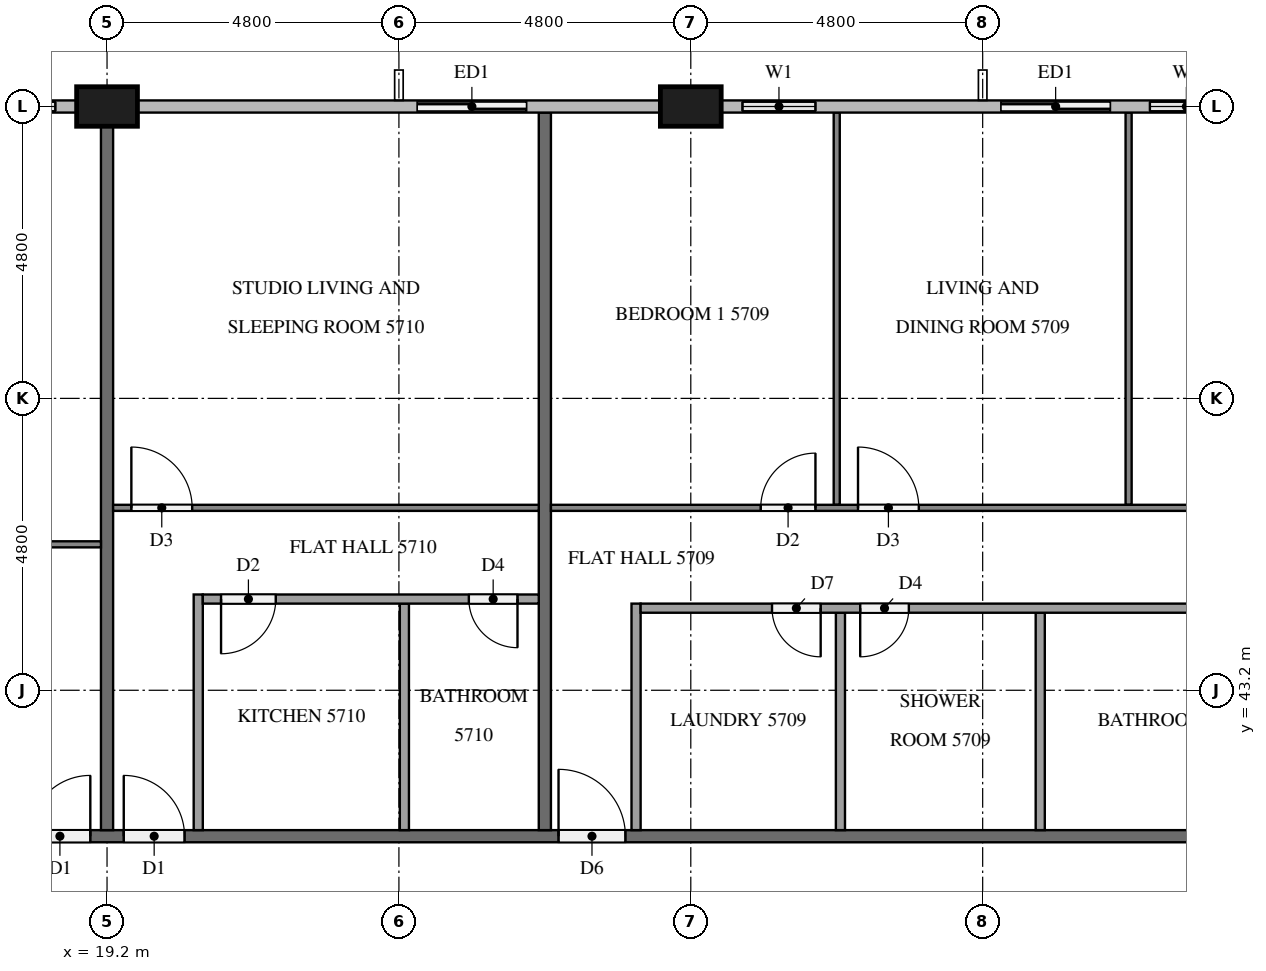
"""IFC4 building model, lengths in metres.
Left out: names, types, materials, properties, quantities, classifications, styles, units other than length and angle.
Written with IfcOpenShell. Run it as: python <this file> out.ifc"""

import sys

from ifc_helpers import new_model, si_unit, direction, frame, frame_2d, origin, origin_2d, place, context, subcontext, project, spatial, rectangle, extrude, element, fill, save


model = new_model("IFC4")
c1 = context("Model", 3, precision=1e-05, world=origin(), true_north=direction((0.0, 1.0)))
c2 = subcontext(c1, "Body", "Model", "MODEL_VIEW")
j1 = project(units=[si_unit("LENGTHUNIT", "METRE"), si_unit("PLANEANGLEUNIT", "RADIAN")], contexts=[c1])
p1 = place(None, origin())
s1 = spatial("IfcSite", under=j1, at=p1, CompositionType="ELEMENT")
p2 = place(p1, origin())
s2 = spatial("IfcBuilding", under=s1, at=p2, CompositionType="ELEMENT")
p3 = place(p2, frame((0.0, 0.0, 219.3)))
s3 = spatial("IfcBuildingStorey", under=s2, at=p3, CompositionType="ELEMENT", Elevation=219.3)
for number, where, z_axis, x_axis in (
    (1, (28.8, 52.8, 0.0), (0.0, 0.0, 1.0), (1.0, 0.0, 0.0)),
    (2, (19.2, 52.8, 0.0), (0.0, 0.0, 1.0), (1.0, 0.0, 0.0)),
):
    element("IfcColumn", number, at=place(p3, frame(where, z_axis=z_axis, x_axis=x_axis)), inside=s3, PredefinedType="COLUMN", context=c2, shape_type="SweptSolid", body=[
        extrude(rectangle(XDim=1.0, YDim=0.65, at=origin_2d()), origin(), (0.0, 0.0, 1.0), 3.2),
    ])
p4 = place(p3, frame((37.9, 52.8, 0.0), z_axis=(0.0, 0.0, 1.0), x_axis=(-1.0, 0.0, 0.0)))
e3 = element("IfcWall", 3, at=p4, inside=s3, PredefinedType="SOLIDWALL", context=c2, shape_type="SweptSolid", body=[
    extrude(rectangle(XDim=4.3, YDim=0.15, at=frame_2d((2.15, 0.0))), origin(), (0.0, 0.0, 1.0), 3.2),
])
p5 = place(p4, frame((0.35, 0.0, 0.9)))
e4 = element("IfcOpeningElement", 4, at=p5, cuts=e3, PredefinedType="OPENING", context=c2, shape_type="SweptSolid", body=[
    extrude(rectangle(XDim=1.2, YDim=1.4, at=frame_2d((0.6, 0.7))), frame((0.0, 0.085, 0.0), z_axis=(0.0, -1.0, 0.0), x_axis=(1.0, 0.0, 0.0)), (0.0, 0.0, 1.0), 0.17),
])
p6 = place(p4, frame((2.2, 0.0, 0.0)))
e5 = element("IfcOpeningElement", 5, at=p6, cuts=e3, PredefinedType="OPENING", context=c2, shape_type="SweptSolid", body=[
    extrude(rectangle(XDim=1.8, YDim=2.4, at=frame_2d((0.9, 1.2))), frame((0.0, 0.085, 0.0), z_axis=(0.0, -1.0, 0.0), x_axis=(1.0, 0.0, 0.0)), (0.0, 0.0, 1.0), 0.17),
])
p7 = place(p3, frame((31.2, 52.8, 0.0), z_axis=(0.0, 0.0, 1.0), x_axis=(-1.0, 0.0, 0.0)))
e6 = element("IfcWall", 6, at=p7, inside=s3, PredefinedType="SOLIDWALL", context=c2, shape_type="SweptSolid", body=[
    extrude(rectangle(XDim=1.9, YDim=0.15, at=frame_2d((0.95, 0.0))), origin(), (0.0, 0.0, 1.0), 3.2),
])
p8 = place(p7, frame((0.35, 0.0, 0.9)))
e7 = element("IfcOpeningElement", 7, at=p8, cuts=e6, PredefinedType="OPENING", context=c2, shape_type="SweptSolid", body=[
    extrude(rectangle(XDim=1.2, YDim=1.4, at=frame_2d((0.6, 0.7))), frame((0.0, 0.085, 0.0), z_axis=(0.0, -1.0, 0.0), x_axis=(1.0, 0.0, 0.0)), (0.0, 0.0, 1.0), 0.17),
])
p9 = place(p3, frame((26.4, 52.8, 0.0), z_axis=(0.0, 0.0, 1.0), x_axis=(-1.0, 0.0, 0.0)))
e8 = element("IfcWall", 8, at=p9, inside=s3, PredefinedType="SOLIDWALL", context=c2, shape_type="SweptSolid", body=[
    extrude(rectangle(XDim=2.4, YDim=0.15, at=frame_2d((1.2, 0.0))), origin(), (0.0, 0.0, 1.0), 3.2),
])
p10 = place(p9, frame((0.3, 0.0, 0.0)))
e9 = element("IfcOpeningElement", 9, at=p10, cuts=e8, PredefinedType="OPENING", context=c2, shape_type="SweptSolid", body=[
    extrude(rectangle(XDim=1.8, YDim=2.4, at=frame_2d((0.9, 1.2))), frame((0.0, 0.085, 0.0), z_axis=(0.0, -1.0, 0.0), x_axis=(1.0, 0.0, 0.0)), (0.0, 0.0, 1.0), 0.17),
])
p11 = place(p3, frame((18.7, 52.8, 0.0), z_axis=(0.0, 0.0, 1.0), x_axis=(-1.0, 0.0, 0.0)))
e10 = element("IfcWall", 10, at=p11, inside=s3, PredefinedType="SOLIDWALL", context=c2, shape_type="SweptSolid", body=[
    extrude(rectangle(XDim=1.9, YDim=0.15, at=frame_2d((0.95, 0.0))), origin(), (0.0, 0.0, 1.0), 3.2),
])
p12 = place(p11, frame((0.35, 0.0, 0.9)))
e11 = element("IfcOpeningElement", 11, at=p12, cuts=e10, PredefinedType="OPENING", context=c2, shape_type="SweptSolid", body=[
    extrude(rectangle(XDim=1.2, YDim=1.4, at=frame_2d((0.6, 0.7))), frame((0.0, 0.085, 0.0), z_axis=(0.0, -1.0, 0.0), x_axis=(1.0, 0.0, 0.0)), (0.0, 0.0, 1.0), 0.17),
])
p13 = place(p3, frame((11.9, 40.8, 0.0), z_axis=(0.0, 0.0, 1.0), x_axis=(1.0, 0.0, 0.0)))
e12 = element("IfcWall", 12, at=p13, inside=s3, PredefinedType="PARTITIONING", context=c2, shape_type="SweptSolid", body=[
    extrude(rectangle(XDim=38.6, YDim=0.2, at=frame_2d((19.3, 0.0))), origin(), (0.0, 0.0, 1.0), 3.2),
])
p14 = place(p13, frame((33.975, 0.0, 0.0)))
e13 = element("IfcOpeningElement", 13, at=p14, cuts=e12, PredefinedType="OPENING", context=c2, shape_type="SweptSolid", body=[
    extrude(rectangle(XDim=1.0, YDim=2.1, at=frame_2d((0.5, 1.05))), frame((0.0, 0.11, 0.0), z_axis=(0.0, -1.0, 0.0), x_axis=(1.0, 0.0, 0.0)), (0.0, 0.0, 1.0), 0.22),
])
p15 = place(p13, frame((14.725, 0.0, 0.0)))
e14 = element("IfcOpeningElement", 14, at=p15, cuts=e12, PredefinedType="OPENING", context=c2, shape_type="SweptSolid", body=[
    extrude(rectangle(XDim=1.1, YDim=2.1, at=frame_2d((0.55, 1.05))), frame((0.0, 0.11, 0.0), z_axis=(0.0, -1.0, 0.0), x_axis=(1.0, 0.0, 0.0)), (0.0, 0.0, 1.0), 0.22),
])
p16 = place(p13, frame((7.575, 0.0, 0.0)))
e15 = element("IfcOpeningElement", 15, at=p16, cuts=e12, PredefinedType="OPENING", context=c2, shape_type="SweptSolid", body=[
    extrude(rectangle(XDim=1.0, YDim=2.1, at=frame_2d((0.5, 1.05))), frame((0.0, 0.11, 0.0), z_axis=(0.0, -1.0, 0.0), x_axis=(1.0, 0.0, 0.0)), (0.0, 0.0, 1.0), 0.22),
])
p17 = place(p13, frame((6.025, 0.0, 0.0)))
e16 = element("IfcOpeningElement", 16, at=p17, cuts=e12, PredefinedType="OPENING", context=c2, shape_type="SweptSolid", body=[
    extrude(rectangle(XDim=1.0, YDim=2.1, at=frame_2d((0.5, 1.05))), frame((0.0, 0.11, 0.0), z_axis=(0.0, -1.0, 0.0), x_axis=(1.0, 0.0, 0.0)), (0.0, 0.0, 1.0), 0.22),
])
p18 = place(p3, frame((26.4, 52.7, 0.0), z_axis=(0.0, 0.0, 1.0), x_axis=(0.0, -1.0, 0.0)))
e17 = element("IfcWall", 17, at=p18, inside=s3, PredefinedType="PARTITIONING", context=c2, shape_type="SweptSolid", body=[
    extrude(rectangle(XDim=11.8, YDim=0.2, at=frame_2d((5.9, 0.0))), origin(), (0.0, 0.0, 1.0), 3.2),
])
p19 = place(p3, frame((19.2, 52.475, 0.0), z_axis=(0.0, 0.0, 1.0), x_axis=(0.0, -1.0, 0.0)))
e18 = element("IfcWall", 18, at=p19, inside=s3, PredefinedType="PARTITIONING", context=c2, shape_type="SweptSolid", body=[
    extrude(rectangle(XDim=11.575, YDim=0.2, at=frame_2d((5.788, 0.0))), origin(), (0.0, 0.0, 1.0), 3.2),
])
for number, where, z_axis, x_axis in (
    (19, (31.2, 46.25, 0.0), (0.0, 0.0, 1.0), (0.0, 1.0, 0.0)),
    (20, (36.0, 46.25, 0.0), (0.0, 0.0, 1.0), (0.0, 1.0, 0.0)),
):
    element("IfcWall", number, at=place(p3, frame(where, z_axis=z_axis, x_axis=x_axis)), inside=s3, PredefinedType="PARTITIONING", context=c2, shape_type="SweptSolid", body=[
        extrude(rectangle(XDim=6.45, YDim=0.1, at=frame_2d((3.225, 0.0))), origin(), (0.0, 0.0, 1.0), 3.2),
    ])
p20 = place(p3, frame((26.5, 46.2, 0.0), z_axis=(0.0, 0.0, 1.0), x_axis=(1.0, 0.0, 0.0)))
e21 = element("IfcWall", 21, at=p20, inside=s3, PredefinedType="PARTITIONING", context=c2, shape_type="SweptSolid", body=[
    extrude(rectangle(XDim=19.0, YDim=0.1, at=frame_2d((9.5, 0.0))), origin(), (0.0, 0.0, 1.0), 3.2),
])
p21 = place(p20, frame((3.45, 0.0, 0.0)))
e22 = element("IfcOpeningElement", 22, at=p21, cuts=e21, PredefinedType="OPENING", context=c2, shape_type="SweptSolid", body=[
    extrude(rectangle(XDim=0.9, YDim=2.1, at=frame_2d((0.45, 1.05))), frame((0.0, 0.06, 0.0), z_axis=(0.0, -1.0, 0.0), x_axis=(1.0, 0.0, 0.0)), (0.0, 0.0, 1.0), 0.12),
])
p22 = place(p20, frame((5.05, 0.0, 0.0)))
e23 = element("IfcOpeningElement", 23, at=p22, cuts=e21, PredefinedType="OPENING", context=c2, shape_type="SweptSolid", body=[
    extrude(rectangle(XDim=1.0, YDim=2.1, at=frame_2d((0.5, 1.05))), frame((0.0, 0.06, 0.0), z_axis=(0.0, -1.0, 0.0), x_axis=(1.0, 0.0, 0.0)), (0.0, 0.0, 1.0), 0.12),
])
p23 = place(p20, frame((13.05, 0.0, 0.0)))
e24 = element("IfcOpeningElement", 24, at=p23, cuts=e21, PredefinedType="OPENING", context=c2, shape_type="SweptSolid", body=[
    extrude(rectangle(XDim=0.9, YDim=2.1, at=frame_2d((0.45, 1.05))), frame((0.0, 0.06, 0.0), z_axis=(0.0, -1.0, 0.0), x_axis=(1.0, 0.0, 0.0)), (0.0, 0.0, 1.0), 0.12),
])
p24 = place(p20, frame((14.65, 0.0, 0.0)))
e25 = element("IfcOpeningElement", 25, at=p24, cuts=e21, PredefinedType="OPENING", context=c2, shape_type="SweptSolid", body=[
    extrude(rectangle(XDim=0.9, YDim=2.1, at=frame_2d((0.45, 1.05))), frame((0.0, 0.06, 0.0), z_axis=(0.0, -1.0, 0.0), x_axis=(1.0, 0.0, 0.0)), (0.0, 0.0, 1.0), 0.12),
])
for number, where, z_axis, x_axis in (
    (26, (31.261, 40.9, 0.0), (0.0, 0.0, 1.0), (0.0, 1.0, 0.0)),
    (27, (34.547, 40.9, 0.0), (0.0, 0.0, 1.0), (0.0, 1.0, 0.0)),
):
    element("IfcWall", number, at=place(p3, frame(where, z_axis=z_axis, x_axis=x_axis)), inside=s3, PredefinedType="PARTITIONING", context=c2, shape_type="SweptSolid", body=[
        extrude(rectangle(XDim=3.575, YDim=0.15, at=frame_2d((1.788, 0.0))), origin(), (0.0, 0.0, 1.0), 3.2),
    ])
p25 = place(p3, frame((27.9, 40.9, 0.0), z_axis=(0.0, 0.0, 1.0), x_axis=(0.0, 1.0, 0.0)))
e28 = element("IfcWall", 28, at=p25, inside=s3, PredefinedType="PARTITIONING", context=c2, shape_type="SweptSolid", body=[
    extrude(rectangle(XDim=3.725, YDim=0.15, at=frame_2d((1.863, 0.0))), origin(), (0.0, 0.0, 1.0), 3.2),
])
p26 = place(p3, frame((45.5, 44.55, 0.0), z_axis=(0.0, 0.0, 1.0), x_axis=(-1.0, 0.0, 0.0)))
e29 = element("IfcWall", 29, at=p26, inside=s3, PredefinedType="PARTITIONING", context=c2, shape_type="SweptSolid", body=[
    extrude(rectangle(XDim=17.525, YDim=0.15, at=frame_2d((8.762, 0.0))), origin(), (0.0, 0.0, 1.0), 3.2),
])
p27 = place(p26, frame((14.564, 0.0, 0.0)))
e30 = element("IfcOpeningElement", 30, at=p27, cuts=e29, PredefinedType="OPENING", context=c2, shape_type="SweptSolid", body=[
    extrude(rectangle(XDim=0.8, YDim=2.1, at=frame_2d((0.4, 1.05))), frame((0.0, 0.085, 0.0), z_axis=(0.0, -1.0, 0.0), x_axis=(1.0, 0.0, 0.0)), (0.0, 0.0, 1.0), 0.17),
])
p28 = place(p26, frame((13.114, 0.0, 0.0)))
e31 = element("IfcOpeningElement", 31, at=p28, cuts=e29, PredefinedType="OPENING", context=c2, shape_type="SweptSolid", body=[
    extrude(rectangle(XDim=0.8, YDim=2.1, at=frame_2d((0.4, 1.05))), frame((0.0, 0.085, 0.0), z_axis=(0.0, -1.0, 0.0), x_axis=(1.0, 0.0, 0.0)), (0.0, 0.0, 1.0), 0.17),
])
p29 = place(p26, frame((6.897, 0.0, 0.0)))
e32 = element("IfcOpeningElement", 32, at=p29, cuts=e29, PredefinedType="OPENING", context=c2, shape_type="SweptSolid", body=[
    extrude(rectangle(XDim=0.9, YDim=2.1, at=frame_2d((0.45, 1.05))), frame((0.0, 0.085, 0.0), z_axis=(0.0, -1.0, 0.0), x_axis=(1.0, 0.0, 0.0)), (0.0, 0.0, 1.0), 0.17),
])
p30 = place(p26, frame((5.347, 0.0, 0.0)))
e33 = element("IfcOpeningElement", 33, at=p30, cuts=e29, PredefinedType="OPENING", context=c2, shape_type="SweptSolid", body=[
    extrude(rectangle(XDim=0.9, YDim=2.1, at=frame_2d((0.45, 1.05))), frame((0.0, 0.085, 0.0), z_axis=(0.0, -1.0, 0.0), x_axis=(1.0, 0.0, 0.0)), (0.0, 0.0, 1.0), 0.17),
])
p31 = place(p3, frame((19.3, 46.2, 0.0), z_axis=(0.0, 0.0, 1.0), x_axis=(1.0, 0.0, 0.0)))
e34 = element("IfcWall", 34, at=p31, inside=s3, PredefinedType="PARTITIONING", context=c2, shape_type="SweptSolid", body=[
    extrude(rectangle(XDim=7.0, YDim=0.1, at=frame_2d((3.5, 0.0))), origin(), (0.0, 0.0, 1.0), 3.2),
])
p32 = place(p31, frame((0.3, 0.0, 0.0)))
e35 = element("IfcOpeningElement", 35, at=p32, cuts=e34, PredefinedType="OPENING", context=c2, shape_type="SweptSolid", body=[
    extrude(rectangle(XDim=1.0, YDim=2.1, at=frame_2d((0.5, 1.05))), frame((0.0, 0.06, 0.0), z_axis=(0.0, -1.0, 0.0), x_axis=(1.0, 0.0, 0.0)), (0.0, 0.0, 1.0), 0.12),
])
p33 = place(p3, frame((24.09, 40.9, 0.0), z_axis=(0.0, 0.0, 1.0), x_axis=(0.0, 1.0, 0.0)))
e36 = element("IfcWall", 36, at=p33, inside=s3, PredefinedType="PARTITIONING", context=c2, shape_type="SweptSolid", body=[
    extrude(rectangle(XDim=3.725, YDim=0.15, at=frame_2d((1.863, 0.0))), origin(), (0.0, 0.0, 1.0), 3.2),
])
p34 = place(p3, frame((20.7, 40.9, 0.0), z_axis=(0.0, 0.0, 1.0), x_axis=(0.0, 1.0, 0.0)))
e37 = element("IfcWall", 37, at=p34, inside=s3, PredefinedType="PARTITIONING", context=c2, shape_type="SweptSolid", body=[
    extrude(rectangle(XDim=3.875, YDim=0.15, at=frame_2d((1.938, 0.0))), origin(), (0.0, 0.0, 1.0), 3.2),
])
p35 = place(p3, frame((26.3, 44.7, 0.0), z_axis=(0.0, 0.0, 1.0), x_axis=(-1.0, 0.0, 0.0)))
e38 = element("IfcWall", 38, at=p35, inside=s3, PredefinedType="PARTITIONING", context=c2, shape_type="SweptSolid", body=[
    extrude(rectangle(XDim=5.525, YDim=0.15, at=frame_2d((2.763, 0.0))), origin(), (0.0, 0.0, 1.0), 3.2),
])
p36 = place(p35, frame((4.325, 0.0, 0.0)))
e39 = element("IfcOpeningElement", 39, at=p36, cuts=e38, PredefinedType="OPENING", context=c2, shape_type="SweptSolid", body=[
    extrude(rectangle(XDim=0.9, YDim=2.1, at=frame_2d((0.45, 1.05))), frame((0.0, 0.085, 0.0), z_axis=(0.0, -1.0, 0.0), x_axis=(1.0, 0.0, 0.0)), (0.0, 0.0, 1.0), 0.17),
])
p37 = place(p35, frame((0.35, 0.0, 0.0)))
e40 = element("IfcOpeningElement", 40, at=p37, cuts=e38, PredefinedType="OPENING", context=c2, shape_type="SweptSolid", body=[
    extrude(rectangle(XDim=0.8, YDim=2.1, at=frame_2d((0.4, 1.05))), frame((0.0, 0.085, 0.0), z_axis=(0.0, -1.0, 0.0), x_axis=(1.0, 0.0, 0.0)), (0.0, 0.0, 1.0), 0.17),
])
p38 = place(p3, frame((4.9, 45.6, 0.0), z_axis=(0.0, 0.0, 1.0), x_axis=(1.0, 0.0, 0.0)))
e41 = element("IfcWall", 41, at=p38, inside=s3, PredefinedType="PARTITIONING", context=c2, shape_type="SweptSolid", body=[
    extrude(rectangle(XDim=14.2, YDim=0.1, at=frame_2d((7.1, 0.0))), origin(), (0.0, 0.0, 1.0), 3.2),
])
p39 = place(p38, frame((9.85, 0.0, 0.0)))
e42 = element("IfcOpeningElement", 42, at=p39, cuts=e41, PredefinedType="OPENING", context=c2, shape_type="SweptSolid", body=[
    extrude(rectangle(XDim=0.9, YDim=2.1, at=frame_2d((0.45, 1.05))), frame((0.0, 0.06, 0.0), z_axis=(0.0, -1.0, 0.0), x_axis=(1.0, 0.0, 0.0)), (0.0, 0.0, 1.0), 0.12),
])
p40 = place(p38, frame((8.25, 0.0, 0.0)))
e43 = element("IfcOpeningElement", 43, at=p40, cuts=e41, PredefinedType="OPENING", context=c2, shape_type="SweptSolid", body=[
    extrude(rectangle(XDim=0.9, YDim=2.1, at=frame_2d((0.45, 1.05))), frame((0.0, 0.06, 0.0), z_axis=(0.0, -1.0, 0.0), x_axis=(1.0, 0.0, 0.0)), (0.0, 0.0, 1.0), 0.12),
])
p41 = place(p38, frame((0.3, 0.0, 0.0)))
e44 = element("IfcOpeningElement", 44, at=p41, cuts=e41, PredefinedType="OPENING", context=c2, shape_type="SweptSolid", body=[
    extrude(rectangle(XDim=1.0, YDim=2.1, at=frame_2d((0.5, 1.05))), frame((0.0, 0.06, 0.0), z_axis=(0.0, -1.0, 0.0), x_axis=(1.0, 0.0, 0.0)), (0.0, 0.0, 1.0), 0.12),
])
p42 = place(p5, origin())
e45 = element("IfcWindow", 45, at=p42, inside=s3, PartitioningType="SINGLE_PANEL", PredefinedType="WINDOW", context=c2, shape_type="SweptSolid", body=[
    extrude(rectangle(XDim=1.2, YDim=1.4, at=frame_2d((0.6, 0.7))), frame((0.0, 0.03, 0.0), z_axis=(0.0, -1.0, 0.0), x_axis=(1.0, 0.0, 0.0)), (0.0, 0.0, 1.0), 0.06),
])
fill(e4, e45)
p43 = place(p6, origin())
e46 = element("IfcDoor", 46, at=p43, inside=s3, OperationType="SLIDING_TO_LEFT", PredefinedType="DOOR", context=c2, shape_type="SweptSolid", body=[
    extrude(rectangle(XDim=1.8, YDim=2.4, at=frame_2d((0.9, 1.2))), frame((0.0, 0.025, 0.0), z_axis=(0.0, -1.0, 0.0), x_axis=(1.0, 0.0, 0.0)), (0.0, 0.0, 1.0), 0.05),
])
fill(e5, e46)
p44 = place(p8, origin())
e47 = element("IfcWindow", 47, at=p44, inside=s3, PartitioningType="SINGLE_PANEL", PredefinedType="WINDOW", context=c2, shape_type="SweptSolid", body=[
    extrude(rectangle(XDim=1.2, YDim=1.4, at=frame_2d((0.6, 0.7))), frame((0.0, 0.03, 0.0), z_axis=(0.0, -1.0, 0.0), x_axis=(1.0, 0.0, 0.0)), (0.0, 0.0, 1.0), 0.06),
])
fill(e7, e47)
p45 = place(p10, origin())
e48 = element("IfcDoor", 48, at=p45, inside=s3, OperationType="SLIDING_TO_RIGHT", PredefinedType="DOOR", context=c2, shape_type="SweptSolid", body=[
    extrude(rectangle(XDim=1.8, YDim=2.4, at=frame_2d((0.9, 1.2))), frame((0.0, 0.025, 0.0), z_axis=(0.0, -1.0, 0.0), x_axis=(1.0, 0.0, 0.0)), (0.0, 0.0, 1.0), 0.05),
])
fill(e9, e48)
p46 = place(p12, origin())
e49 = element("IfcWindow", 49, at=p46, inside=s3, PartitioningType="SINGLE_PANEL", PredefinedType="WINDOW", context=c2, shape_type="SweptSolid", body=[
    extrude(rectangle(XDim=1.2, YDim=1.4, at=frame_2d((0.6, 0.7))), frame((0.0, 0.03, 0.0), z_axis=(0.0, -1.0, 0.0), x_axis=(1.0, 0.0, 0.0)), (0.0, 0.0, 1.0), 0.06),
])
fill(e11, e49)
p47 = place(p15, origin())
e50 = element("IfcDoor", 50, at=p47, inside=s3, OperationType="SINGLE_SWING_LEFT", PredefinedType="DOOR", context=c2, shape_type="SweptSolid", body=[
    extrude(rectangle(XDim=1.1, YDim=2.1, at=frame_2d((0.55, 1.05))), frame((0.0, 0.025, 0.0), z_axis=(0.0, -1.0, 0.0), x_axis=(1.0, 0.0, 0.0)), (0.0, 0.0, 1.0), 0.05),
])
fill(e14, e50)
p48 = place(p16, origin())
e51 = element("IfcDoor", 51, at=p48, inside=s3, OperationType="SINGLE_SWING_LEFT", PredefinedType="DOOR", context=c2, shape_type="SweptSolid", body=[
    extrude(rectangle(XDim=1.0, YDim=2.1, at=frame_2d((0.5, 1.05))), frame((0.0, 0.025, 0.0), z_axis=(0.0, -1.0, 0.0), x_axis=(1.0, 0.0, 0.0)), (0.0, 0.0, 1.0), 0.05),
])
fill(e15, e51)
p49 = place(p17, origin())
e52 = element("IfcDoor", 52, at=p49, inside=s3, OperationType="SINGLE_SWING_RIGHT", PredefinedType="DOOR", context=c2, shape_type="SweptSolid", body=[
    extrude(rectangle(XDim=1.0, YDim=2.1, at=frame_2d((0.5, 1.05))), frame((0.0, 0.025, 0.0), z_axis=(0.0, -1.0, 0.0), x_axis=(1.0, 0.0, 0.0)), (0.0, 0.0, 1.0), 0.05),
])
fill(e16, e52)
p50 = place(p21, origin())
e53 = element("IfcDoor", 53, at=p50, inside=s3, OperationType="SINGLE_SWING_RIGHT", PredefinedType="DOOR", context=c2, shape_type="SweptSolid", body=[
    extrude(rectangle(XDim=0.9, YDim=2.1, at=frame_2d((0.45, 1.05))), frame((0.0, 0.025, 0.0), z_axis=(0.0, -1.0, 0.0), x_axis=(1.0, 0.0, 0.0)), (0.0, 0.0, 1.0), 0.05),
])
fill(e22, e53)
p51 = place(p22, origin())
e54 = element("IfcDoor", 54, at=p51, inside=s3, OperationType="SINGLE_SWING_LEFT", PredefinedType="DOOR", context=c2, shape_type="SweptSolid", body=[
    extrude(rectangle(XDim=1.0, YDim=2.1, at=frame_2d((0.5, 1.05))), frame((0.0, 0.025, 0.0), z_axis=(0.0, -1.0, 0.0), x_axis=(1.0, 0.0, 0.0)), (0.0, 0.0, 1.0), 0.05),
])
fill(e23, e54)
p52 = place(p27, origin())
e55 = element("IfcDoor", 55, at=p52, inside=s3, OperationType="SINGLE_SWING_LEFT", PredefinedType="DOOR", context=c2, shape_type="SweptSolid", body=[
    extrude(rectangle(XDim=0.8, YDim=2.1, at=frame_2d((0.4, 1.05))), frame((0.0, 0.025, 0.0), z_axis=(0.0, -1.0, 0.0), x_axis=(1.0, 0.0, 0.0)), (0.0, 0.0, 1.0), 0.05),
])
fill(e30, e55)
p53 = place(p28, origin())
e56 = element("IfcDoor", 56, at=p53, inside=s3, OperationType="SINGLE_SWING_RIGHT", PredefinedType="DOOR", context=c2, shape_type="SweptSolid", body=[
    extrude(rectangle(XDim=0.8, YDim=2.1, at=frame_2d((0.4, 1.05))), frame((0.0, 0.025, 0.0), z_axis=(0.0, -1.0, 0.0), x_axis=(1.0, 0.0, 0.0)), (0.0, 0.0, 1.0), 0.05),
])
fill(e31, e56)
p54 = place(p32, origin())
e57 = element("IfcDoor", 57, at=p54, inside=s3, OperationType="SINGLE_SWING_LEFT", PredefinedType="DOOR", context=c2, shape_type="SweptSolid", body=[
    extrude(rectangle(XDim=1.0, YDim=2.1, at=frame_2d((0.5, 1.05))), frame((0.0, 0.025, 0.0), z_axis=(0.0, -1.0, 0.0), x_axis=(1.0, 0.0, 0.0)), (0.0, 0.0, 1.0), 0.05),
])
fill(e35, e57)
p55 = place(p36, origin())
e58 = element("IfcDoor", 58, at=p55, inside=s3, OperationType="SINGLE_SWING_RIGHT", PredefinedType="DOOR", context=c2, shape_type="SweptSolid", body=[
    extrude(rectangle(XDim=0.9, YDim=2.1, at=frame_2d((0.45, 1.05))), frame((0.0, 0.025, 0.0), z_axis=(0.0, -1.0, 0.0), x_axis=(1.0, 0.0, 0.0)), (0.0, 0.0, 1.0), 0.05),
])
fill(e39, e58)
p56 = place(p37, origin())
e59 = element("IfcDoor", 59, at=p56, inside=s3, OperationType="SINGLE_SWING_LEFT", PredefinedType="DOOR", context=c2, shape_type="SweptSolid", body=[
    extrude(rectangle(XDim=0.8, YDim=2.1, at=frame_2d((0.4, 1.05))), frame((0.0, 0.025, 0.0), z_axis=(0.0, -1.0, 0.0), x_axis=(1.0, 0.0, 0.0)), (0.0, 0.0, 1.0), 0.05),
])
fill(e40, e59)
save(model, sys.argv[1])
